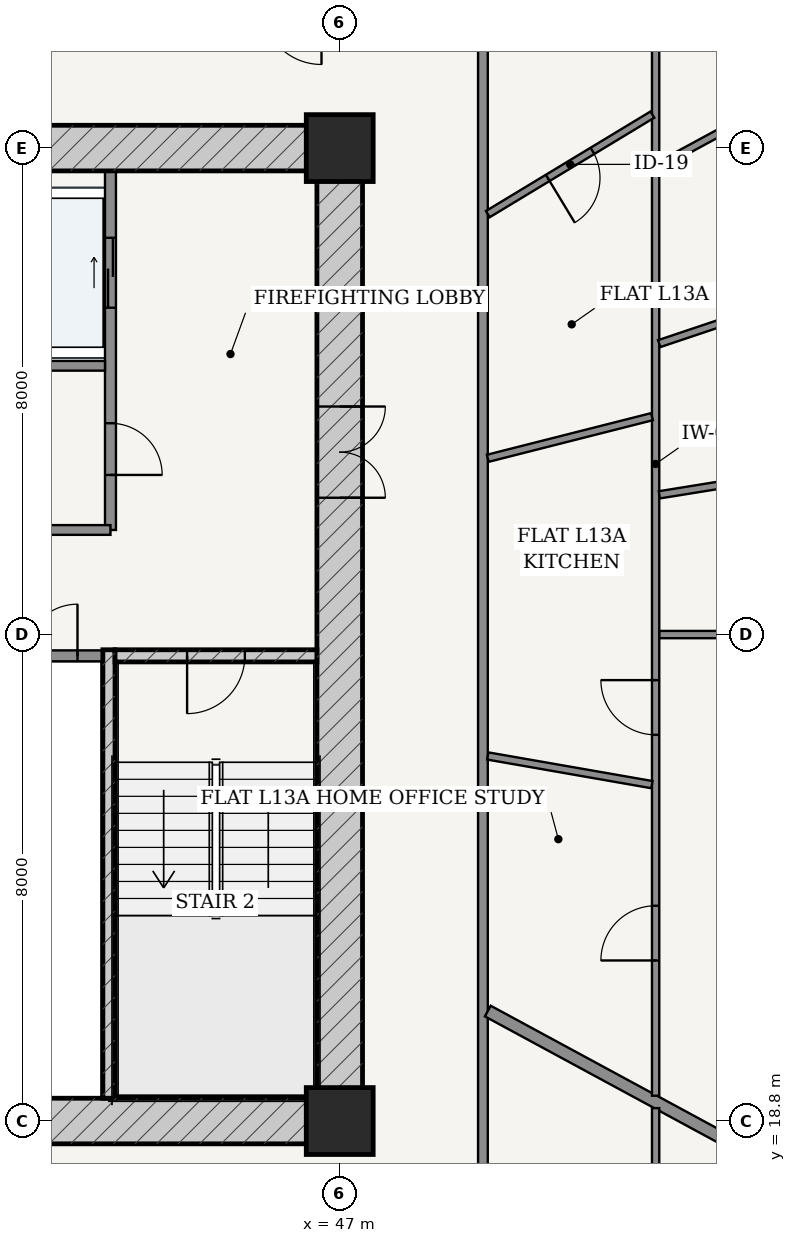
"""IFC4 building model, lengths in metres.
Left out: names, types, materials, properties, quantities, classifications, styles, units other than length and angle.
Written with IfcOpenShell. Run it as: python <this file> out.ifc"""

import sys

from ifc_helpers import new_model, si_unit, direction, frame, frame_2d, origin, origin_2d, place, context, subcontext, project, spatial, rectangle, extrude, source, transform, mapped, element, fill, save


model = new_model("IFC4")
c1 = context("Model", 3, precision=1e-05, world=origin(), true_north=direction((-0.2419218956, 0.970295726276)))
c2 = subcontext(c1, "Body", "Model", "MODEL_VIEW")
j1 = project(units=[si_unit("LENGTHUNIT", "METRE"), si_unit("PLANEANGLEUNIT", "RADIAN")], contexts=[c1])
p1 = place(None, origin())
s1 = spatial("IfcSite", under=j1, at=p1, CompositionType="ELEMENT")
p2 = place(p1, origin())
s2 = spatial("IfcBuilding", under=s1, at=p2, CompositionType="ELEMENT")
p3 = place(p2, frame((0.0, 0.0, 52.8)))
s3 = spatial("IfcBuildingStorey", under=s2, at=p3, CompositionType="ELEMENT", Elevation=52.8)
for number, where, z_axis, x_axis in (
    (1, (47.0, 18.8, 0.0), (0.0, 0.0, 1.0), (1.0, 0.0, 0.0)),
    (2, (47.0, 34.8, 0.0), (0.0, 0.0, 1.0), (1.0, 0.0, 0.0)),
):
    element("IfcColumn", number, at=place(p3, frame(where, z_axis=z_axis, x_axis=x_axis)), inside=s3, PredefinedType="COLUMN", context=c2, shape_type="SweptSolid", body=[
        extrude(rectangle(XDim=1.1, YDim=1.1, at=origin_2d()), origin(), (0.0, 0.0, 1.0), 3.6),
    ])
p4 = place(p3, frame((28.625, 18.8, 0.0), z_axis=(0.0, 0.0, 1.0), x_axis=(1.0, 0.0, 0.0)))
e3 = element("IfcWall", 3, at=p4, inside=s3, PredefinedType="SHEAR", context=c2, shape_type="SweptSolid", body=[
    extrude(rectangle(XDim=18.75, YDim=0.75, at=frame_2d((9.375, 0.0))), origin(), (0.0, 0.0, 1.0), 3.32),
])
p5 = place(p4, frame((7.627, 0.0, 0.0)))
e4 = element("IfcOpeningElement", 4, at=p5, cuts=e3, PredefinedType="OPENING", context=c2, shape_type="SweptSolid", body=[
    extrude(rectangle(XDim=0.85, YDim=2.1, at=frame_2d((0.425, 1.05))), frame((0.0, 0.385, 0.0), z_axis=(0.0, -1.0, 0.0), x_axis=(1.0, 0.0, 0.0)), (0.0, 0.0, 1.0), 0.77),
])
p6 = place(p4, frame((10.673, 0.0, 0.0)))
e5 = element("IfcOpeningElement", 5, at=p6, cuts=e3, PredefinedType="OPENING", context=c2, shape_type="SweptSolid", body=[
    extrude(rectangle(XDim=0.85, YDim=2.1, at=frame_2d((0.425, 1.05))), frame((0.0, 0.385, 0.0), z_axis=(0.0, -1.0, 0.0), x_axis=(1.0, 0.0, 0.0)), (0.0, 0.0, 1.0), 0.77),
])
p7 = place(p3, frame((28.625, 34.8, 0.0), z_axis=(0.0, 0.0, 1.0), x_axis=(1.0, 0.0, 0.0)))
e6 = element("IfcWall", 6, at=p7, inside=s3, PredefinedType="SHEAR", context=c2, shape_type="SweptSolid", body=[
    extrude(rectangle(XDim=18.75, YDim=0.75, at=frame_2d((9.375, 0.0))), origin(), (0.0, 0.0, 1.0), 3.32),
])
p8 = place(p7, frame((6.887, 0.0, 0.0)))
e7 = element("IfcOpeningElement", 7, at=p8, cuts=e6, PredefinedType="OPENING", context=c2, shape_type="SweptSolid", body=[
    extrude(rectangle(XDim=0.85, YDim=2.1, at=frame_2d((0.425, 1.05))), frame((0.0, 0.385, 0.0), z_axis=(0.0, -1.0, 0.0), x_axis=(1.0, 0.0, 0.0)), (0.0, 0.0, 1.0), 0.77),
])
p9 = place(p7, frame((8.945, 0.0, 0.0)))
e8 = element("IfcOpeningElement", 8, at=p9, cuts=e6, PredefinedType="OPENING", context=c2, shape_type="SweptSolid", body=[
    extrude(rectangle(XDim=0.86, YDim=2.1, at=frame_2d((0.43, 1.05))), frame((0.0, 0.385, 0.0), z_axis=(0.0, -1.0, 0.0), x_axis=(1.0, 0.0, 0.0)), (0.0, 0.0, 1.0), 0.77),
])
p10 = place(p7, frame((11.012, 0.0, 0.0)))
e9 = element("IfcOpeningElement", 9, at=p10, cuts=e6, PredefinedType="OPENING", context=c2, shape_type="SweptSolid", body=[
    extrude(rectangle(XDim=0.85, YDim=2.1, at=frame_2d((0.425, 1.05))), frame((0.0, 0.385, 0.0), z_axis=(0.0, -1.0, 0.0), x_axis=(1.0, 0.0, 0.0)), (0.0, 0.0, 1.0), 0.77),
])
p11 = place(p3, frame((47.0, 19.175, 0.0), z_axis=(0.0, 0.0, 1.0), x_axis=(0.0, 1.0, 0.0)))
e10 = element("IfcWall", 10, at=p11, inside=s3, PredefinedType="SHEAR", context=c2, shape_type="SweptSolid", body=[
    extrude(rectangle(XDim=15.25, YDim=0.75, at=frame_2d((7.625, 0.0))), origin(), (0.0, 0.0, 1.0), 3.32),
])
p12 = place(p11, frame((9.875, 0.0, 0.0)))
e11 = element("IfcOpeningElement", 11, at=p12, cuts=e10, PredefinedType="OPENING", context=c2, shape_type="SweptSolid", body=[
    extrude(rectangle(XDim=1.5, YDim=2.2, at=frame_2d((0.75, 1.1))), frame((0.0, 0.385, 0.0), z_axis=(0.0, -1.0, 0.0), x_axis=(1.0, 0.0, 0.0)), (0.0, 0.0, 1.0), 0.77),
])
p13 = place(p3, frame((43.205, 19.175, 0.0), z_axis=(0.0, 0.0, 1.0), x_axis=(0.0, 1.0, 0.0)))
e12 = element("IfcWall", 12, at=p13, inside=s3, PredefinedType="SOLIDWALL", context=c2, shape_type="SweptSolid", body=[
    extrude(rectangle(XDim=7.375, YDim=0.2, at=frame_2d((3.688, 0.0))), origin(), (0.0, 0.0, 1.0), 3.32),
])
p14 = place(p3, frame((43.305, 26.45, 0.0), z_axis=(0.0, 0.0, 1.0), x_axis=(1.0, 0.0, 0.0)))
e13 = element("IfcWall", 13, at=p14, inside=s3, PredefinedType="SOLIDWALL", context=c2, shape_type="SweptSolid", body=[
    extrude(rectangle(XDim=3.32, YDim=0.2, at=frame_2d((1.66, 0.0))), origin(), (0.0, 0.0, 1.0), 3.32),
])
p15 = place(p14, frame((1.185, 0.0, 0.0)))
e14 = element("IfcOpeningElement", 14, at=p15, cuts=e13, PredefinedType="OPENING", context=c2, shape_type="SweptSolid", body=[
    extrude(rectangle(XDim=0.95, YDim=2.15, at=frame_2d((0.475, 1.075))), frame((0.0, 0.11, 0.0), z_axis=(0.0, -1.0, 0.0), x_axis=(1.0, 0.0, 0.0)), (0.0, 0.0, 1.0), 0.22),
])
p16 = place(p3, frame((41.425, 26.45, 0.0), z_axis=(0.0, 0.0, 1.0), x_axis=(1.0, 0.0, 0.0)))
e15 = element("IfcWall", 15, at=p16, inside=s3, PredefinedType="PARTITIONING", context=c2, shape_type="SweptSolid", body=[
    extrude(rectangle(XDim=1.675, YDim=0.18, at=frame_2d((0.837, 0.0))), origin(), (0.0, 0.0, 1.0), 3.32),
])
p17 = place(p16, frame((0.413, 0.0, 0.0)))
e16 = element("IfcOpeningElement", 16, at=p17, cuts=e15, PredefinedType="OPENING", context=c2, shape_type="SweptSolid", body=[
    extrude(rectangle(XDim=0.85, YDim=2.1, at=frame_2d((0.425, 1.05))), frame((0.0, 0.1, 0.0), z_axis=(0.0, -1.0, 0.0), x_axis=(1.0, 0.0, 0.0)), (0.0, 0.0, 1.0), 0.2),
])
p18 = place(p3, frame((43.23, 28.52, 0.0), z_axis=(0.0, 0.0, 1.0), x_axis=(0.0, 1.0, 0.0)))
e17 = element("IfcWall", 17, at=p18, inside=s3, PredefinedType="PARTITIONING", context=c2, shape_type="SweptSolid", body=[
    extrude(rectangle(XDim=5.905, YDim=0.18, at=frame_2d((2.953, 0.0))), origin(), (0.0, 0.0, 1.0), 3.32),
])
p19 = place(p18, frame((0.905, 0.0, 0.0)))
e18 = element("IfcOpeningElement", 18, at=p19, cuts=e17, PredefinedType="OPENING", context=c2, shape_type="SweptSolid", body=[
    extrude(rectangle(XDim=0.85, YDim=2.1, at=frame_2d((0.425, 1.05))), frame((0.0, 0.1, 0.0), z_axis=(0.0, -1.0, 0.0), x_axis=(1.0, 0.0, 0.0)), (0.0, 0.0, 1.0), 0.2),
])
p20 = place(p18, frame((3.655, 0.0, 0.0)))
e19 = element("IfcOpeningElement", 19, at=p20, cuts=e17, PredefinedType="OPENING", context=c2, shape_type="SweptSolid", body=[
    extrude(rectangle(XDim=1.15, YDim=2.2, at=frame_2d((0.575, 1.1))), frame((0.0, 0.1, 0.0), z_axis=(0.0, -1.0, 0.0), x_axis=(1.0, 0.0, 0.0)), (0.0, 0.0, 1.0), 0.2),
])
p21 = place(p3, frame((41.425, 31.22, 0.0), z_axis=(0.0, 0.0, 1.0), x_axis=(1.0, 0.0, 0.0)))
e20 = element("IfcWall", 20, at=p21, inside=s3, PredefinedType="PARTITIONING", context=c2, shape_type="SweptSolid", body=[
    extrude(rectangle(XDim=1.715, YDim=0.16, at=frame_2d((0.857, 0.0))), origin(), (0.0, 0.0, 1.0), 3.32),
])
p22 = place(p3, frame((41.425, 28.52, 0.0), z_axis=(0.0, 0.0, 1.0), x_axis=(1.0, 0.0, 0.0)))
e21 = element("IfcWall", 21, at=p22, inside=s3, PredefinedType="PARTITIONING", context=c2, shape_type="SweptSolid", body=[
    extrude(rectangle(XDim=1.805, YDim=0.16, at=frame_2d((0.902, 0.0))), origin(), (0.0, 0.0, 1.0), 3.32),
])
p23 = place(p3, frame((49.355, 16.525, 0.0), z_axis=(0.0, 0.0, 1.0), x_axis=(0.0, 1.0, 0.0)))
e22 = element("IfcWall", 22, at=p23, inside=s3, PredefinedType="PARTITIONING", context=c2, shape_type="SweptSolid", body=[
    extrude(rectangle(XDim=20.55, YDim=0.16, at=frame_2d((10.275, 0.0))), origin(), (0.0, 0.0, 1.0), 2.688),
])
p24 = place(p3, frame((49.435, 20.608, 0.0), z_axis=(0.0, 0.0, 1.0), x_axis=(0.879369737803, -0.476139542819, 0.0)))
e23 = element("IfcWall", 23, at=p24, inside=s3, PredefinedType="PARTITIONING", context=c2, shape_type="SweptSolid", body=[
    extrude(rectangle(XDim=14.295, YDim=0.2, at=frame_2d((7.147, 0.0))), origin(), (0.0, 0.0, 1.0), 2.688),
])
p25 = place(p3, frame((52.195, 39.995, 0.0), z_axis=(0.0, 0.0, 1.0), x_axis=(0.0, -1.0, 0.0)))
e24 = element("IfcWall", 24, at=p25, inside=s3, PredefinedType="PARTITIONING", context=c2, shape_type="SweptSolid", body=[
    extrude(rectangle(XDim=20.779, YDim=0.12, at=frame_2d((10.39, 0.0))), origin(), (0.0, 0.0, 1.0), 2.688),
])
p26 = place(p25, frame((13.944, 0.0, 0.0)))
e25 = element("IfcOpeningElement", 25, at=p26, cuts=e24, PredefinedType="OPENING", context=c2, shape_type="SweptSolid", body=[
    extrude(rectangle(XDim=0.9, YDim=2.15, at=frame_2d((0.45, 1.075))), frame((0.0, 0.07, 0.0), z_axis=(0.0, -1.0, 0.0), x_axis=(1.0, 0.0, 0.0)), (0.0, 0.0, 1.0), 0.14),
])
p27 = place(p25, frame((17.655, 0.0, 0.0)))
e26 = element("IfcOpeningElement", 26, at=p27, cuts=e24, PredefinedType="OPENING", context=c2, shape_type="SweptSolid", body=[
    extrude(rectangle(XDim=0.9, YDim=2.15, at=frame_2d((0.45, 1.075))), frame((0.0, 0.07, 0.0), z_axis=(0.0, -1.0, 0.0), x_axis=(1.0, 0.0, 0.0)), (0.0, 0.0, 1.0), 0.14),
])
p28 = place(p3, frame((52.257, 26.8, 0.0), z_axis=(0.0, 0.0, 1.0), x_axis=(1.0, 0.0, 0.0)))
e27 = element("IfcWall", 27, at=p28, inside=s3, PredefinedType="PARTITIONING", context=c2, shape_type="SweptSolid", body=[
    extrude(rectangle(XDim=14.683, YDim=0.12, at=frame_2d((7.341, 0.0))), origin(), (0.0, 0.0, 1.0), 2.762),
])
p29 = place(p28, frame((6.892, 0.0, 0.0)))
e28 = element("IfcOpeningElement", 28, at=p29, cuts=e27, PredefinedType="OPENING", context=c2, shape_type="SweptSolid", body=[
    extrude(rectangle(XDim=0.9, YDim=2.15, at=frame_2d((0.45, 1.075))), frame((0.0, 0.07, 0.0), z_axis=(0.0, -1.0, 0.0), x_axis=(1.0, 0.0, 0.0)), (0.0, 0.0, 1.0), 0.14),
])
p30 = place(p3, frame((52.256, 29.098, 0.0), z_axis=(0.0, 0.0, 1.0), x_axis=(0.987257017041, 0.159133850272, 0.0)))
e29 = element("IfcWall", 29, at=p30, inside=s3, PredefinedType="PARTITIONING", context=c2, shape_type="SweptSolid", body=[
    extrude(rectangle(XDim=14.248, YDim=0.12, at=frame_2d((7.124, 0.0))), origin(), (0.0, 0.0, 1.0), 2.688),
])
p31 = place(p30, frame((5.603, 0.0, 0.0)))
e30 = element("IfcOpeningElement", 30, at=p31, cuts=e29, PredefinedType="OPENING", context=c2, shape_type="SweptSolid", body=[
    extrude(rectangle(XDim=0.9, YDim=2.15, at=frame_2d((0.45, 1.075))), frame((0.0, 0.07, 0.0), z_axis=(0.0, -1.0, 0.0), x_axis=(1.0, 0.0, 0.0)), (0.0, 0.0, 1.0), 0.14),
])
p32 = place(p3, frame((52.254, 31.584, 0.0), z_axis=(0.0, 0.0, 1.0), x_axis=(0.948022802246, 0.318202398516, 0.0)))
e31 = element("IfcWall", 31, at=p32, inside=s3, PredefinedType="PARTITIONING", context=c2, shape_type="SweptSolid", body=[
    extrude(rectangle(XDim=13.163, YDim=0.12, at=frame_2d((6.582, 0.0))), origin(), (0.0, 0.0, 1.0), 2.762),
])
p33 = place(p32, frame((6.131, 0.0, 0.0)))
e32 = element("IfcOpeningElement", 32, at=p33, cuts=e31, PredefinedType="OPENING", context=c2, shape_type="SweptSolid", body=[
    extrude(rectangle(XDim=0.9, YDim=2.15, at=frame_2d((0.45, 1.075))), frame((0.0, 0.07, 0.0), z_axis=(0.0, -1.0, 0.0), x_axis=(1.0, 0.0, 0.0)), (0.0, 0.0, 1.0), 0.14),
])
p34 = place(p3, frame((52.25, 34.515, 0.0), z_axis=(0.0, 0.0, 1.0), x_axis=(0.879370672984, 0.476137815654, 0.0)))
e33 = element("IfcWall", 33, at=p34, inside=s3, PredefinedType="PARTITIONING", context=c2, shape_type="SweptSolid", body=[
    extrude(rectangle(XDim=11.094, YDim=0.12, at=frame_2d((5.547, 0.0))), origin(), (0.0, 0.0, 1.0), 2.688),
])
p35 = place(p34, frame((4.034, 0.0, 0.0)))
e34 = element("IfcOpeningElement", 34, at=p35, cuts=e33, PredefinedType="OPENING", context=c2, shape_type="SweptSolid", body=[
    extrude(rectangle(XDim=0.9, YDim=2.15, at=frame_2d((0.45, 1.075))), frame((0.0, 0.07, 0.0), z_axis=(0.0, -1.0, 0.0), x_axis=(1.0, 0.0, 0.0)), (0.0, 0.0, 1.0), 0.14),
])
p36 = place(p3, frame((49.435, 24.803, 0.0), z_axis=(0.0, 0.0, 1.0), x_axis=(0.985100365489, -0.171980434681, 0.0)))
e35 = element("IfcWall", 35, at=p36, inside=s3, PredefinedType="PARTITIONING", context=c2, shape_type="SweptSolid", body=[
    extrude(rectangle(XDim=2.74, YDim=0.12, at=frame_2d((1.37, 0.0))), origin(), (0.0, 0.0, 1.0), 3.32),
])
p37 = place(p3, frame((49.435, 29.699, 0.0), z_axis=(0.0, 0.0, 1.0), x_axis=(0.969327617988, 0.245772189243, 0.0)))
e36 = element("IfcWall", 36, at=p37, inside=s3, PredefinedType="PARTITIONING", context=c2, shape_type="SweptSolid", body=[
    extrude(rectangle(XDim=2.785, YDim=0.12, at=frame_2d((1.393, 0.0))), origin(), (0.0, 0.0, 1.0), 3.32),
])
p38 = place(p3, frame((49.435, 33.714, 0.0), z_axis=(0.0, 0.0, 1.0), x_axis=(0.855724035959, 0.517432482824, 0.0)))
e37 = element("IfcWall", 37, at=p38, inside=s3, PredefinedType="PARTITIONING", context=c2, shape_type="SweptSolid", body=[
    extrude(rectangle(XDim=3.163, YDim=0.12, at=frame_2d((1.582, 0.0))), origin(), (0.0, 0.0, 1.0), 3.32),
])
p39 = place(p38, frame((1.152, 0.0, 0.0)))
e38 = element("IfcOpeningElement", 38, at=p39, cuts=e37, PredefinedType="OPENING", context=c2, shape_type="SweptSolid", body=[
    extrude(rectangle(XDim=0.86, YDim=2.15, at=frame_2d((0.43, 1.075))), frame((0.0, 0.07, 0.0), z_axis=(0.0, -1.0, 0.0), x_axis=(1.0, 0.0, 0.0)), (0.0, 0.0, 1.0), 0.14),
])
p40 = place(p3, frame((52.195, 19.012, 0.0), z_axis=(0.0, 0.0, 1.0), x_axis=(0.0, -1.0, 0.0)))
e39 = element("IfcWall", 39, at=p40, inside=s3, PredefinedType="PARTITIONING", context=c2, shape_type="SweptSolid", body=[
    extrude(rectangle(XDim=5.407, YDim=0.12, at=frame_2d((2.704, 0.0))), origin(), (0.0, 0.0, 1.0), 2.999),
])
m1 = source(origin(), c2, "Body", "SweptSolid", [
    extrude(rectangle(XDim=1.5, YDim=2.2, at=frame_2d((0.75, 1.1))), frame((0.0, 0.025, 0.0), z_axis=(0.0, -1.0, 0.0), x_axis=(1.0, 0.0, 0.0)), (0.0, 0.0, 1.0), 0.05),
])
p41 = place(p12, frame((1.5, 0.0, 0.0), z_axis=(0.0, 0.0, 1.0), x_axis=(-1.0, 0.0, 0.0)))
e40 = element("IfcDoor", 40, at=p41, inside=s3, OperationType="DOUBLE_DOOR_SINGLE_SWING", PredefinedType="DOOR", context=c2, shape_type="MappedRepresentation", body=[
    mapped(m1, transform((0.0, 0.0, 0.0), scale=1.0)),
])
fill(e11, e40)
m2 = source(origin(), c2, "Body", "SweptSolid", [
    extrude(rectangle(XDim=0.95, YDim=2.15, at=frame_2d((0.475, 1.075))), frame((0.0, 0.025, 0.0), z_axis=(0.0, -1.0, 0.0), x_axis=(1.0, 0.0, 0.0)), (0.0, 0.0, 1.0), 0.05),
])
p42 = place(p15, frame((0.95, 0.0, 0.0), z_axis=(0.0, 0.0, 1.0), x_axis=(-1.0, 0.0, 0.0)))
e41 = element("IfcDoor", 41, at=p42, inside=s3, OperationType="SINGLE_SWING_RIGHT", PredefinedType="DOOR", context=c2, shape_type="MappedRepresentation", body=[
    mapped(m2, transform((0.0, 0.0, 0.0), scale=1.0)),
])
fill(e14, e41)
m3 = source(origin(), c2, "Body", "SweptSolid", [
    extrude(rectangle(XDim=0.85, YDim=2.1, at=frame_2d((0.425, 1.05))), frame((0.0, 0.025, 0.0), z_axis=(0.0, -1.0, 0.0), x_axis=(1.0, 0.0, 0.0)), (0.0, 0.0, 1.0), 0.05),
])
p43 = place(p17, origin())
e42 = element("IfcDoor", 42, at=p43, inside=s3, OperationType="SINGLE_SWING_RIGHT", PredefinedType="DOOR", context=c2, shape_type="MappedRepresentation", body=[
    mapped(m3, transform((0.0, 0.0, 0.0), scale=1.0)),
])
fill(e16, e42)
p44 = place(p19, frame((0.85, 0.0, 0.0), z_axis=(0.0, 0.0, 1.0), x_axis=(-1.0, 0.0, 0.0)))
e43 = element("IfcDoor", 43, at=p44, inside=s3, OperationType="SINGLE_SWING_RIGHT", PredefinedType="DOOR", context=c2, shape_type="MappedRepresentation", body=[
    mapped(m3, transform((0.0, 0.0, 0.0), scale=1.0)),
])
fill(e18, e43)
m4 = source(origin(), c2, "Body", "SweptSolid", [
    extrude(rectangle(XDim=1.15, YDim=2.2, at=frame_2d((0.575, 1.1))), frame((0.0, 0.025, 0.0), z_axis=(0.0, -1.0, 0.0), x_axis=(1.0, 0.0, 0.0)), (0.0, 0.0, 1.0), 0.05),
])
p45 = place(p20, origin())
e44 = element("IfcDoor", 44, at=p45, inside=s3, OperationType="DOUBLE_DOOR_SLIDING", PredefinedType="DOOR", context=c2, shape_type="MappedRepresentation", body=[
    mapped(m4, transform((0.0, 0.0, 0.0), scale=1.0)),
])
fill(e19, e44)
m5 = source(origin(), c2, "Body", "SweptSolid", [
    extrude(rectangle(XDim=0.86, YDim=2.15, at=frame_2d((0.43, 1.075))), frame((0.0, 0.025, 0.0), z_axis=(0.0, -1.0, 0.0), x_axis=(1.0, 0.0, 0.0)), (0.0, 0.0, 1.0), 0.05),
])
p46 = place(p39, frame((0.86, 0.0, 0.0), z_axis=(0.0, 0.0, 1.0), x_axis=(-1.0, 0.0, 0.0)))
e45 = element("IfcDoor", 45, at=p46, inside=s3, OperationType="SINGLE_SWING_RIGHT", PredefinedType="DOOR", context=c2, shape_type="MappedRepresentation", body=[
    mapped(m5, transform((0.0, 0.0, 0.0), scale=1.0)),
])
fill(e38, e45)
m6 = source(origin(), c2, "Body", "SweptSolid", [
    extrude(rectangle(XDim=0.9, YDim=2.15, at=frame_2d((0.45, 1.075))), frame((0.0, 0.025, 0.0), z_axis=(0.0, -1.0, 0.0), x_axis=(1.0, 0.0, 0.0)), (0.0, 0.0, 1.0), 0.05),
])
p47 = place(p26, frame((0.9, 0.0, 0.0), z_axis=(0.0, 0.0, 1.0), x_axis=(-1.0, 0.0, 0.0)))
e46 = element("IfcDoor", 46, at=p47, inside=s3, OperationType="SINGLE_SWING_RIGHT", PredefinedType="DOOR", context=c2, shape_type="MappedRepresentation", body=[
    mapped(m6, transform((0.0, 0.0, 0.0), scale=1.0)),
])
fill(e25, e46)
p48 = place(p27, frame((0.9, 0.0, 0.0), z_axis=(0.0, 0.0, 1.0), x_axis=(-1.0, 0.0, 0.0)))
e47 = element("IfcDoor", 47, at=p48, inside=s3, OperationType="SINGLE_SWING_LEFT", PredefinedType="DOOR", context=c2, shape_type="MappedRepresentation", body=[
    mapped(m6, transform((0.0, 0.0, 0.0), scale=1.0)),
])
fill(e26, e47)
save(model, sys.argv[1])
